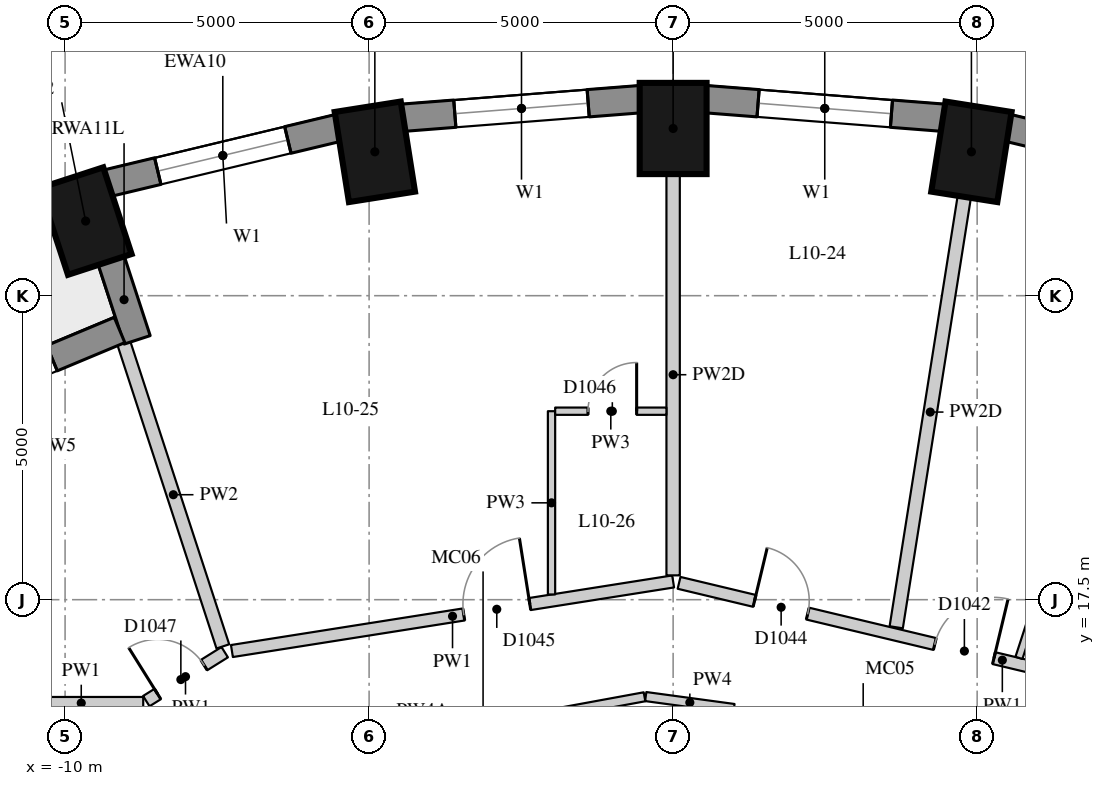
"""IFC4 building model, lengths in metres.
Left out: names, types, materials, properties, quantities, classifications, styles, units other than length and angle.
Written with IfcOpenShell. Run it as: python <this file> out.ifc"""

import sys

from ifc_helpers import new_model, si_unit, direction, frame, frame_2d, origin, origin_2d, place, context, subcontext, project, spatial, rectangle, extrude, element, fill, save


model = new_model("IFC4")
c1 = context("Model", 3, precision=1e-05, world=origin(), true_north=direction((0.0, 1.0)))
c2 = subcontext(c1, "Body", "Model", "MODEL_VIEW")
j1 = project(units=[si_unit("LENGTHUNIT", "METRE"), si_unit("PLANEANGLEUNIT", "RADIAN")], contexts=[c1])
p1 = place(None, origin())
s1 = spatial("IfcSite", under=j1, at=p1, CompositionType="ELEMENT")
p2 = place(p1, origin())
s2 = spatial("IfcBuilding", under=s1, at=p2, CompositionType="ELEMENT")
p3 = place(p2, frame((0.0, 0.0, 41.5)))
s3 = spatial("IfcBuildingStorey", under=s2, at=p3, CompositionType="ELEMENT", Elevation=41.5)
for number, where, z_axis, x_axis in (
    (1, (4.906, 24.866, 0.0), (0.0, 0.0, 1.0), (0.156, 0.988, 0.0)),
    (2, (0.0, 25.25, 0.0), (0.0, 0.0, 1.0), (0.0, 1.0, 0.0)),
    (3, (-4.906, 24.866, 0.0), (0.0, 0.0, 1.0), (-0.156, 0.988, 0.0)),
    (4, (-9.662, 23.727, 0.0), (0.0, 0.0, 1.0), (-0.31, 0.951, 0.0)),
):
    element("IfcColumn", number, at=place(p3, frame(where, z_axis=z_axis, x_axis=x_axis)), inside=s3, PredefinedType="COLUMN", context=c2, shape_type="SweptSolid", body=[
        extrude(rectangle(XDim=1.5, YDim=1.1, at=origin_2d()), origin(), (0.0, 0.0, 1.0), 3.3),
    ])
p4 = place(p3, frame((9.308, 24.35, 0.0), z_axis=(0.0, 0.0, 1.0), x_axis=(-0.972496561493, 0.232917233979, 0.0)))
e5 = element("IfcWall", 5, at=p4, inside=s3, PredefinedType="SOLIDWALL", context=c2, shape_type="SweptSolid", body=[
    extrude(rectangle(XDim=3.911, YDim=0.45, at=frame_2d((1.956, 0.0))), origin(), (0.0, 0.0, 1.0), 3.02),
])
p5 = place(p4, frame((0.855, 0.0, 0.4)))
e6 = element("IfcOpeningElement", 6, at=p5, cuts=e5, PredefinedType="OPENING", context=c2, shape_type="SweptSolid", body=[
    extrude(rectangle(XDim=2.2, YDim=1.75, at=frame_2d((1.1, 0.875))), frame((0.0, 0.235, 0.0), z_axis=(0.0, -1.0, 0.0), x_axis=(1.0, 0.0, 0.0)), (0.0, 0.0, 1.0), 0.47),
])
p6 = place(p3, frame((4.457, 25.426, 0.0), z_axis=(0.0, 0.0, 1.0), x_axis=(-0.996955972145, 0.077966592873, 0.0)))
e7 = element("IfcWall", 7, at=p6, inside=s3, PredefinedType="SOLIDWALL", context=c2, shape_type="SweptSolid", body=[
    extrude(rectangle(XDim=3.939, YDim=0.45, at=frame_2d((1.97, 0.0))), origin(), (0.0, 0.0, 1.0), 3.02),
])
p7 = place(p6, frame((0.87, 0.0, 0.4)))
e8 = element("IfcOpeningElement", 8, at=p7, cuts=e7, PredefinedType="OPENING", context=c2, shape_type="SweptSolid", body=[
    extrude(rectangle(XDim=2.2, YDim=1.75, at=frame_2d((1.1, 0.875))), frame((0.0, 0.235, 0.0), z_axis=(0.0, -1.0, 0.0), x_axis=(1.0, 0.0, 0.0)), (0.0, 0.0, 1.0), 0.47),
])
p8 = place(p3, frame((-0.53, 25.733, 0.0), z_axis=(0.0, 0.0, 1.0), x_axis=(-0.996955972145, -0.077966592873, 0.0)))
e9 = element("IfcWall", 9, at=p8, inside=s3, PredefinedType="SOLIDWALL", context=c2, shape_type="SweptSolid", body=[
    extrude(rectangle(XDim=3.939, YDim=0.45, at=frame_2d((1.97, 0.0))), origin(), (0.0, 0.0, 1.0), 3.02),
])
p9 = place(p8, frame((0.87, 0.0, 0.4)))
e10 = element("IfcOpeningElement", 10, at=p9, cuts=e9, PredefinedType="OPENING", context=c2, shape_type="SweptSolid", body=[
    extrude(rectangle(XDim=2.2, YDim=1.75, at=frame_2d((1.1, 0.875))), frame((0.0, 0.235, 0.0), z_axis=(0.0, -1.0, 0.0), x_axis=(1.0, 0.0, 0.0)), (0.0, 0.0, 1.0), 0.47),
])
p10 = place(p3, frame((-5.504, 25.26, 0.0), z_axis=(0.0, 0.0, 1.0), x_axis=(-0.972496561493, -0.232917233979, 0.0)))
e11 = element("IfcWall", 11, at=p10, inside=s3, PredefinedType="SOLIDWALL", context=c2, shape_type="SweptSolid", body=[
    extrude(rectangle(XDim=3.911, YDim=0.45, at=frame_2d((1.956, 0.0))), origin(), (0.0, 0.0, 1.0), 3.02),
])
p11 = place(p10, frame((0.855, 0.0, 0.4)))
e12 = element("IfcOpeningElement", 12, at=p11, cuts=e11, PredefinedType="OPENING", context=c2, shape_type="SweptSolid", body=[
    extrude(rectangle(XDim=2.2, YDim=1.75, at=frame_2d((1.1, 0.875))), frame((0.0, 0.235, 0.0), z_axis=(0.0, -1.0, 0.0), x_axis=(1.0, 0.0, 0.0)), (0.0, 0.0, 1.0), 0.47),
])
p12 = place(p3, frame((-9.246, 23.095, 0.0), z_axis=(0.0, 0.0, 1.0), x_axis=(0.310110311429, -0.950700581017, 0.0)))
e13 = element("IfcWall", 13, at=p12, inside=s3, PredefinedType="SOLIDWALL", context=c2, shape_type="SweptSolid", body=[
    extrude(rectangle(XDim=1.39, YDim=0.45, at=frame_2d((0.695, 0.0))), origin(), (0.0, 0.0, 1.0), 3.02),
])
p13 = place(p3, frame((-9.104, 21.936, 0.0), z_axis=(0.0, 0.0, 1.0), x_axis=(-0.922645368502, -0.385649483317, 0.0)))
e14 = element("IfcWall", 14, at=p13, inside=s3, PredefinedType="SOLIDWALL", context=c2, shape_type="SweptSolid", body=[
    extrude(rectangle(XDim=4.559, YDim=0.45, at=frame_2d((2.279, 0.0))), origin(), (0.0, 0.0, 1.0), 3.02),
])
p14 = place(p13, frame((1.204, 0.0, 0.4)))
e15 = element("IfcOpeningElement", 15, at=p14, cuts=e14, PredefinedType="OPENING", context=c2, shape_type="SweptSolid", body=[
    extrude(rectangle(XDim=1.0, YDim=1.75, at=frame_2d((0.5, 0.875))), frame((0.0, 0.235, 0.0), z_axis=(0.0, -1.0, 0.0), x_axis=(1.0, 0.0, 0.0)), (0.0, 0.0, 1.0), 0.47),
])
p15 = place(p13, frame((2.354, 0.0, 0.0)))
e16 = element("IfcOpeningElement", 16, at=p15, cuts=e14, PredefinedType="OPENING", context=c2, shape_type="SweptSolid", body=[
    extrude(rectangle(XDim=1.0, YDim=2.15, at=frame_2d((0.5, 1.075))), frame((0.0, 0.235, 0.0), z_axis=(0.0, -1.0, 0.0), x_axis=(1.0, 0.0, 0.0)), (0.0, 0.0, 1.0), 0.47),
])
p16 = place(p3, frame((-10.753, 15.8, 0.0), z_axis=(0.0, 0.0, 1.0), x_axis=(1.0, 0.0, 0.0)))
e17 = element("IfcWall", 17, at=p16, inside=s3, PredefinedType="PARTITIONING", context=c2, shape_type="SweptSolid", body=[
    extrude(rectangle(XDim=2.039, YDim=0.2, at=frame_2d((1.019, 0.0))), origin(), (0.0, 0.0, 1.0), 3.02),
])
p17 = place(p3, frame((-8.664, 15.832, 0.0), z_axis=(0.0, 0.0, 1.0), x_axis=(0.848304931689, 0.529508019648, 0.0)))
e18 = element("IfcWall", 18, at=p17, inside=s3, PredefinedType="PARTITIONING", context=c2, shape_type="SweptSolid", body=[
    extrude(rectangle(XDim=1.52, YDim=0.2, at=frame_2d((0.76, 0.0))), origin(), (0.0, 0.0, 1.0), 3.02),
])
p18 = place(p17, frame((0.22, 0.0, 0.0)))
e19 = element("IfcOpeningElement", 19, at=p18, cuts=e18, PredefinedType="OPENING", context=c2, shape_type="SweptSolid", body=[
    extrude(rectangle(XDim=0.9, YDim=2.1, at=frame_2d((0.45, 1.05))), frame((0.0, 0.11, 0.0), z_axis=(0.0, -1.0, 0.0), x_axis=(1.0, 0.0, 0.0)), (0.0, 0.0, 1.0), 0.22),
])
p19 = place(p3, frame((-7.256, 16.656, 0.0), z_axis=(0.0, 0.0, 1.0), x_axis=(0.987787475409, 0.15580726371, 0.0)))
e20 = element("IfcWall", 20, at=p19, inside=s3, PredefinedType="PARTITIONING", context=c2, shape_type="SweptSolid", body=[
    extrude(rectangle(XDim=7.346, YDim=0.2, at=frame_2d((3.673, 0.0))), origin(), (0.0, 0.0, 1.0), 3.02),
])
p20 = place(p19, frame((3.86, 0.0, 0.0)))
e21 = element("IfcOpeningElement", 21, at=p20, cuts=e20, PredefinedType="OPENING", context=c2, shape_type="SweptSolid", body=[
    extrude(rectangle(XDim=1.1, YDim=2.1, at=frame_2d((0.55, 1.05))), frame((0.0, 0.11, 0.0), z_axis=(0.0, -1.0, 0.0), x_axis=(1.0, 0.0, 0.0)), (0.0, 0.0, 1.0), 0.22),
])
p21 = place(p3, frame((0.098, 17.777, 0.0), z_axis=(0.0, 0.0, 1.0), x_axis=(0.97258196627, -0.232560355362, 0.0)))
e22 = element("IfcWall", 22, at=p21, inside=s3, PredefinedType="PARTITIONING", context=c2, shape_type="SweptSolid", body=[
    extrude(rectangle(XDim=10.933, YDim=0.2, at=frame_2d((5.466, 0.0))), origin(), (0.0, 0.0, 1.0), 3.02),
])
p22 = place(p21, frame((9.613, 0.0, 0.0)))
e23 = element("IfcOpeningElement", 23, at=p22, cuts=e22, PredefinedType="OPENING", context=c2, shape_type="SweptSolid", body=[
    extrude(rectangle(XDim=1.1, YDim=2.1, at=frame_2d((0.55, 1.05))), frame((0.0, 0.11, 0.0), z_axis=(0.0, -1.0, 0.0), x_axis=(1.0, 0.0, 0.0)), (0.0, 0.0, 1.0), 0.22),
])
p23 = place(p21, frame((4.325, 0.0, 0.0)))
e24 = element("IfcOpeningElement", 24, at=p23, cuts=e22, PredefinedType="OPENING", context=c2, shape_type="SweptSolid", body=[
    extrude(rectangle(XDim=1.0, YDim=2.1, at=frame_2d((0.5, 1.05))), frame((0.0, 0.11, 0.0), z_axis=(0.0, -1.0, 0.0), x_axis=(1.0, 0.0, 0.0)), (0.0, 0.0, 1.0), 0.22),
])
p24 = place(p21, frame((1.276, 0.0, 0.0)))
e25 = element("IfcOpeningElement", 25, at=p24, cuts=e22, PredefinedType="OPENING", context=c2, shape_type="SweptSolid", body=[
    extrude(rectangle(XDim=0.9, YDim=2.1, at=frame_2d((0.45, 1.05))), frame((0.0, 0.11, 0.0), z_axis=(0.0, -1.0, 0.0), x_axis=(1.0, 0.0, 0.0)), (0.0, 0.0, 1.0), 0.22),
])
p25 = place(p3, frame((-0.451, 15.907, 0.0), z_axis=(0.0, 0.0, 1.0), x_axis=(0.99094751199, -0.134249873301, 0.0)))
e26 = element("IfcWall", 26, at=p25, inside=s3, PredefinedType="PARTITIONING", context=c2, shape_type="SweptSolid", body=[
    extrude(rectangle(XDim=1.464, YDim=0.15, at=frame_2d((0.732, 0.0))), origin(), (0.0, 0.0, 1.0), 3.02),
])
p26 = place(p3, frame((-7.021, 14.701, 0.0), z_axis=(0.0, 0.0, 1.0), x_axis=(0.983567630435, 0.180540068573, 0.0)))
e27 = element("IfcWall", 27, at=p26, inside=s3, PredefinedType="PARTITIONING", context=c2, shape_type="SweptSolid", body=[
    extrude(rectangle(XDim=6.66, YDim=0.15, at=frame_2d((3.33, 0.0))), origin(), (0.0, 0.0, 1.0), 2.57),
])
p27 = place(p3, frame((4.788, 24.125, 0.0), z_axis=(0.0, 0.0, 1.0), x_axis=(-0.156146236489, -0.987733948404, 0.0)))
e28 = element("IfcWall", 28, at=p27, inside=s3, PredefinedType="PARTITIONING", context=c2, shape_type="SweptSolid", body=[
    extrude(rectangle(XDim=7.167, YDim=0.22, at=frame_2d((3.583, 0.0))), origin(), (0.0, 0.0, 1.0), 2.47),
])
p28 = place(p3, frame((0.0, 24.5, 0.0), z_axis=(0.0, 0.0, 1.0), x_axis=(0.0, -1.0, 0.0)))
e29 = element("IfcWall", 29, at=p28, inside=s3, PredefinedType="PARTITIONING", context=c2, shape_type="SweptSolid", body=[
    extrude(rectangle(XDim=6.6, YDim=0.22, at=frame_2d((3.3, 0.0))), origin(), (0.0, 0.0, 1.0), 2.47),
])
p29 = place(p3, frame((-9.034, 21.721, 0.0), z_axis=(0.0, 0.0, 1.0), x_axis=(0.310304845104, -0.950637103791, 0.0)))
e30 = element("IfcWall", 30, at=p29, inside=s3, PredefinedType="PARTITIONING", context=c2, shape_type="SweptSolid", body=[
    extrude(rectangle(XDim=5.249, YDim=0.22, at=frame_2d((2.624, 0.0))), origin(), (0.0, 0.0, 1.0), 3.02),
])
p30 = place(p3, frame((5.687, 16.543, 0.0), z_axis=(0.0, 0.0, 1.0), x_axis=(0.310246659943, 0.950656094492, 0.0)))
e31 = element("IfcWall", 31, at=p30, inside=s3, PredefinedType="PARTITIONING", context=c2, shape_type="SweptSolid", body=[
    extrude(rectangle(XDim=2.525, YDim=0.12, at=frame_2d((1.263, 0.0))), origin(), (0.0, 0.0, 1.0), 3.02),
])
p31 = place(p3, frame((-2.0, 17.586, 0.0), z_axis=(0.0, 0.0, 1.0), x_axis=(0.0, 1.0, 0.0)))
e32 = element("IfcWall", 32, at=p31, inside=s3, PredefinedType="PARTITIONING", context=c2, shape_type="SweptSolid", body=[
    extrude(rectangle(XDim=3.014, YDim=0.12, at=frame_2d((1.507, 0.0))), origin(), (0.0, 0.0, 1.0), 3.02),
])
p32 = place(p3, frame((-1.94, 20.6, 0.0), z_axis=(0.0, 0.0, 1.0), x_axis=(1.0, 0.0, 0.0)))
e33 = element("IfcWall", 33, at=p32, inside=s3, PredefinedType="PARTITIONING", context=c2, shape_type="SweptSolid", body=[
    extrude(rectangle(XDim=1.83, YDim=0.12, at=frame_2d((0.915, 0.0))), origin(), (0.0, 0.0, 1.0), 3.02),
])
p33 = place(p32, frame((0.54, 0.0, 0.0)))
e34 = element("IfcOpeningElement", 34, at=p33, cuts=e33, PredefinedType="OPENING", context=c2, shape_type="SweptSolid", body=[
    extrude(rectangle(XDim=0.8, YDim=2.1, at=frame_2d((0.4, 1.05))), frame((0.0, 0.07, 0.0), z_axis=(0.0, -1.0, 0.0), x_axis=(1.0, 0.0, 0.0)), (0.0, 0.0, 1.0), 0.14),
])
p34 = place(p7, origin())
e35 = element("IfcWindow", 35, at=p34, inside=s3, PartitioningType="SINGLE_PANEL", PredefinedType="WINDOW", context=c2, shape_type="SweptSolid", body=[
    extrude(rectangle(XDim=2.2, YDim=1.75, at=frame_2d((1.1, 0.875))), frame((0.0, 0.035, 0.0), z_axis=(0.0, -1.0, 0.0), x_axis=(1.0, 0.0, 0.0)), (0.0, 0.0, 1.0), 0.06),
])
fill(e8, e35)
p35 = place(p9, origin())
e36 = element("IfcWindow", 36, at=p35, inside=s3, PartitioningType="SINGLE_PANEL", PredefinedType="WINDOW", context=c2, shape_type="SweptSolid", body=[
    extrude(rectangle(XDim=2.2, YDim=1.75, at=frame_2d((1.1, 0.875))), frame((0.0, 0.035, 0.0), z_axis=(0.0, -1.0, 0.0), x_axis=(1.0, 0.0, 0.0)), (0.0, 0.0, 1.0), 0.06),
])
fill(e10, e36)
p36 = place(p11, origin())
e37 = element("IfcWindow", 37, at=p36, inside=s3, PartitioningType="SINGLE_PANEL", PredefinedType="WINDOW", context=c2, shape_type="SweptSolid", body=[
    extrude(rectangle(XDim=2.2, YDim=1.75, at=frame_2d((1.1, 0.875))), frame((0.0, 0.035, 0.0), z_axis=(0.0, -1.0, 0.0), x_axis=(1.0, 0.0, 0.0)), (0.0, 0.0, 1.0), 0.06),
])
fill(e12, e37)
p37 = place(p14, origin())
e38 = element("IfcWindow", 38, at=p37, inside=s3, PartitioningType="SINGLE_PANEL", PredefinedType="WINDOW", context=c2, shape_type="SweptSolid", body=[
    extrude(rectangle(XDim=1.0, YDim=1.75, at=frame_2d((0.5, 0.875))), frame((0.0, 0.035, 0.0), z_axis=(0.0, -1.0, 0.0), x_axis=(1.0, 0.0, 0.0)), (0.0, 0.0, 1.0), 0.06),
])
fill(e15, e38)
p38 = place(p23, origin())
e39 = element("IfcDoor", 39, at=p38, inside=s3, OperationType="SINGLE_SWING_RIGHT", PredefinedType="DOOR", context=c2, shape_type="SweptSolid", body=[
    extrude(rectangle(XDim=1.0, YDim=2.1, at=frame_2d((0.5, 1.05))), frame((0.0, 0.025, 0.0), z_axis=(0.0, -1.0, 0.0), x_axis=(1.0, 0.0, 0.0)), (0.0, 0.0, 1.0), 0.05),
])
fill(e24, e39)
p39 = place(p24, origin())
e40 = element("IfcDoor", 40, at=p39, inside=s3, OperationType="SINGLE_SWING_LEFT", PredefinedType="DOOR", context=c2, shape_type="SweptSolid", body=[
    extrude(rectangle(XDim=0.9, YDim=2.1, at=frame_2d((0.45, 1.05))), frame((0.0, 0.025, 0.0), z_axis=(0.0, -1.0, 0.0), x_axis=(1.0, 0.0, 0.0)), (0.0, 0.0, 1.0), 0.05),
])
fill(e25, e40)
p40 = place(p20, origin())
e41 = element("IfcDoor", 41, at=p40, inside=s3, OperationType="SINGLE_SWING_RIGHT", PredefinedType="DOOR", context=c2, shape_type="SweptSolid", body=[
    extrude(rectangle(XDim=1.1, YDim=2.1, at=frame_2d((0.55, 1.05))), frame((0.0, 0.025, 0.0), z_axis=(0.0, -1.0, 0.0), x_axis=(1.0, 0.0, 0.0)), (0.0, 0.0, 1.0), 0.05),
])
fill(e21, e41)
p41 = place(p33, origin())
e42 = element("IfcDoor", 42, at=p41, inside=s3, OperationType="SINGLE_SWING_RIGHT", PredefinedType="DOOR", context=c2, shape_type="SweptSolid", body=[
    extrude(rectangle(XDim=0.8, YDim=2.1, at=frame_2d((0.4, 1.05))), frame((0.0, 0.025, 0.0), z_axis=(0.0, -1.0, 0.0), x_axis=(1.0, 0.0, 0.0)), (0.0, 0.0, 1.0), 0.05),
])
fill(e34, e42)
p42 = place(p18, origin())
e43 = element("IfcDoor", 43, at=p42, inside=s3, OperationType="SINGLE_SWING_LEFT", PredefinedType="DOOR", context=c2, shape_type="SweptSolid", body=[
    extrude(rectangle(XDim=0.9, YDim=2.1, at=frame_2d((0.45, 1.05))), frame((0.0, 0.025, 0.0), z_axis=(0.0, -1.0, 0.0), x_axis=(1.0, 0.0, 0.0)), (0.0, 0.0, 1.0), 0.05),
])
fill(e19, e43)
save(model, sys.argv[1])
